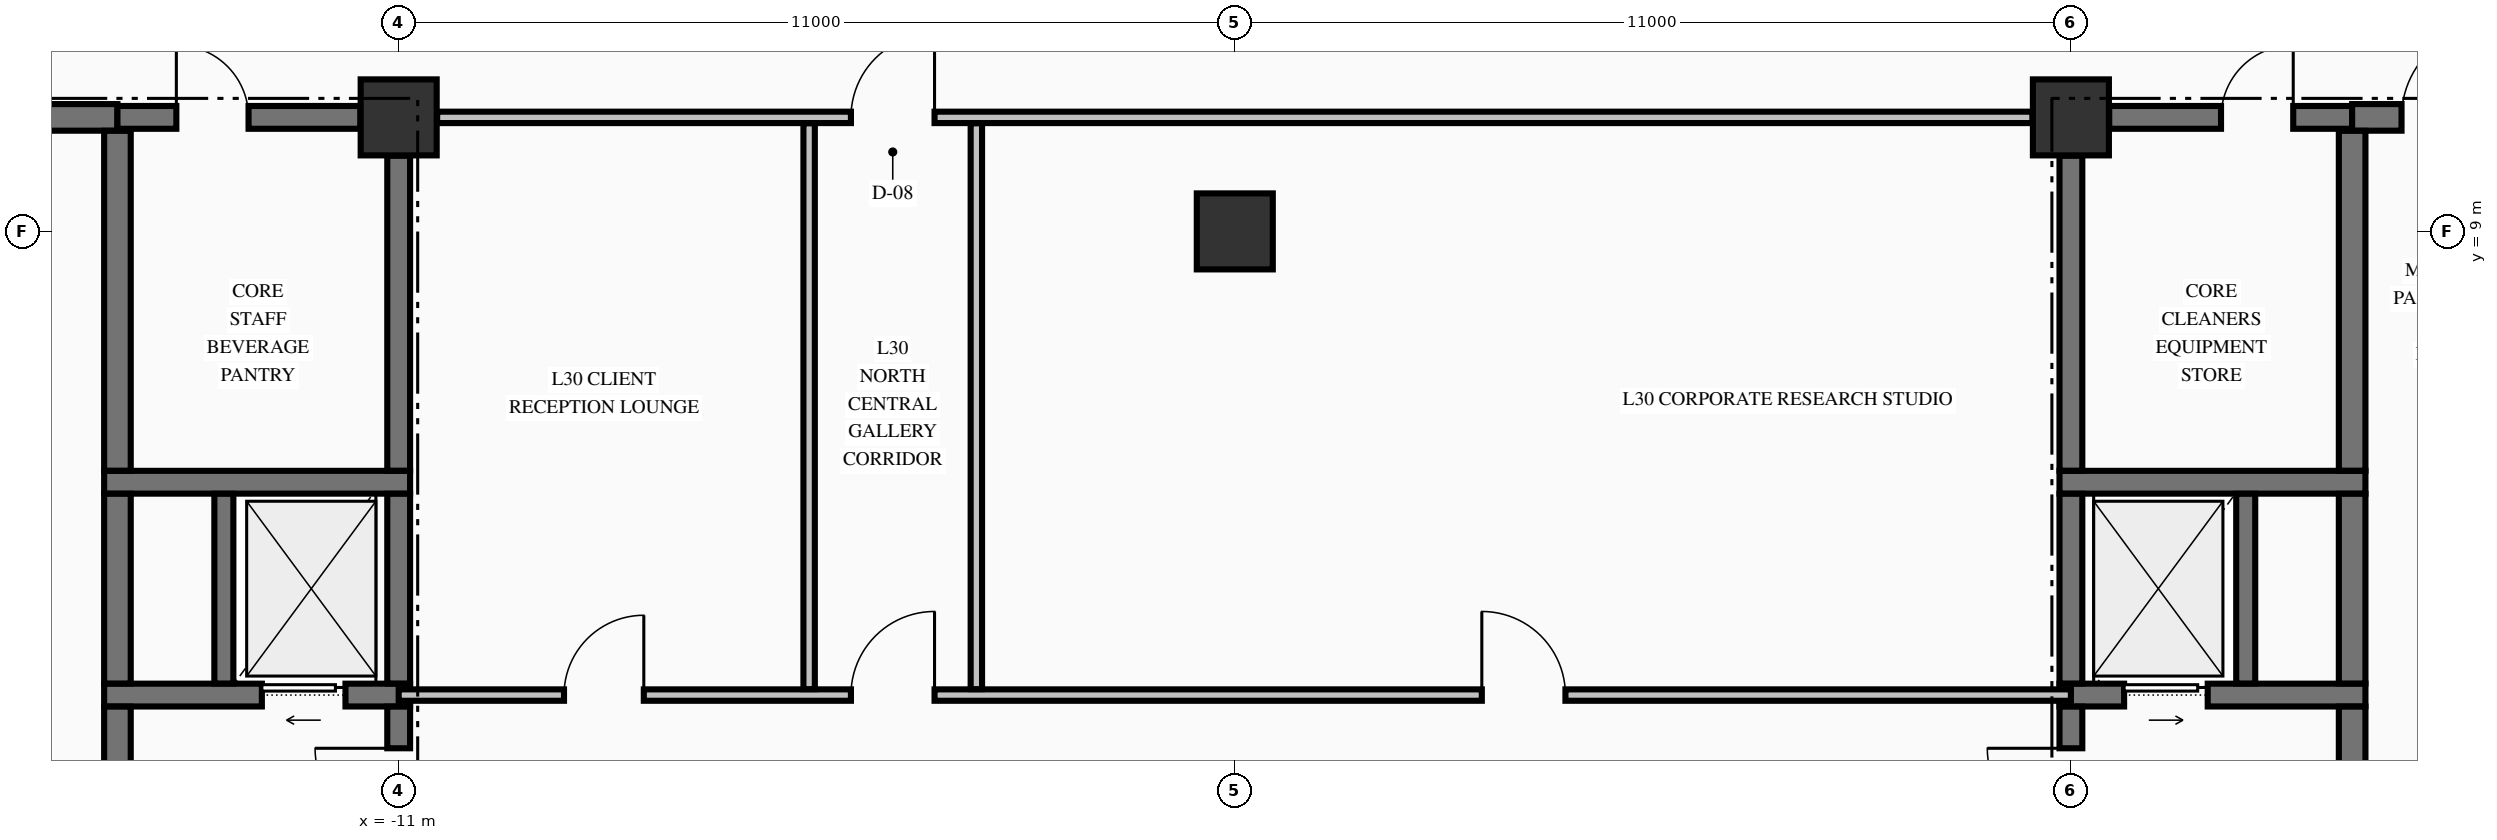
"""IFC4 building model, lengths in metres.
Left out: names, types, materials, properties, quantities, classifications, styles, units other than length and angle.
Written with IfcOpenShell. Run it as: python <this file> out.ifc"""

import sys

from ifc_helpers import new_model, si_unit, direction, frame, frame_2d, origin, origin_2d, place, context, subcontext, project, spatial, rectangle, extrude, element, fill, save


model = new_model("IFC4")
c1 = context("Model", 3, precision=1e-05, world=origin(), true_north=direction((0.0, 1.0)))
c2 = subcontext(c1, "Body", "Model", "MODEL_VIEW")
j1 = project(units=[si_unit("LENGTHUNIT", "METRE"), si_unit("PLANEANGLEUNIT", "RADIAN")], contexts=[c1])
p1 = place(None, origin())
s1 = spatial("IfcSite", under=j1, at=p1, CompositionType="ELEMENT")
p2 = place(p1, origin())
s2 = spatial("IfcBuilding", under=s1, at=p2, CompositionType="ELEMENT")
p3 = place(p2, frame((0.0, 0.0, 121.35)))
s3 = spatial("IfcBuildingStorey", under=s2, at=p3, CompositionType="ELEMENT", Elevation=121.35)
for number, where, z_axis, x_axis in (
    (1, (-11.0, 10.5, -0.425), (0.0, 0.0, 1.0), (1.0, 0.0, 0.0)),
    (2, (11.0, 10.5, -0.425), (0.0, 0.0, 1.0), (1.0, 0.0, 0.0)),
    (3, (0.0, 9.0, -0.425), (0.0, 0.0, 1.0), (1.0, 0.0, 0.0)),
):
    element("IfcColumn", number, at=place(p3, frame(where, z_axis=z_axis, x_axis=x_axis)), inside=s3, PredefinedType="COLUMN", context=c2, shape_type="SweptSolid", body=[
        extrude(rectangle(XDim=1.0, YDim=1.0, at=origin_2d()), origin(), (0.0, 0.0, 1.0), 3.745),
    ])
p4 = place(p3, frame((-14.875, 2.9, 0.0), z_axis=(0.0, 0.0, 1.0), x_axis=(1.0, 0.0, 0.0)))
e4 = element("IfcWall", 4, at=p4, inside=s3, PredefinedType="SHEAR", context=c2, shape_type="SweptSolid", body=[
    extrude(rectangle(XDim=4.025, YDim=0.3, at=frame_2d((2.012, 0.0))), origin(), (0.0, 0.0, 1.0), 3.32),
])
p5 = place(p4, frame((2.075, 0.0, 0.0)))
e5 = element("IfcOpeningElement", 5, at=p5, cuts=e4, PredefinedType="OPENING", context=c2, shape_type="SweptSolid", body=[
    extrude(rectangle(XDim=1.1, YDim=2.2, at=frame_2d((0.55, 1.1))), frame((0.0, 0.16, 0.0), z_axis=(0.0, -1.0, 0.0), x_axis=(1.0, 0.0, 0.0)), (0.0, 0.0, 1.0), 0.32),
])
p6 = place(p3, frame((10.85, 2.9, 0.0), z_axis=(0.0, 0.0, 1.0), x_axis=(1.0, 0.0, 0.0)))
e6 = element("IfcWall", 6, at=p6, inside=s3, PredefinedType="SHEAR", context=c2, shape_type="SweptSolid", body=[
    extrude(rectangle(XDim=4.025, YDim=0.3, at=frame_2d((2.012, 0.0))), origin(), (0.0, 0.0, 1.0), 3.32),
])
p7 = place(p6, frame((0.85, 0.0, 0.0)))
e7 = element("IfcOpeningElement", 7, at=p7, cuts=e6, PredefinedType="OPENING", context=c2, shape_type="SweptSolid", body=[
    extrude(rectangle(XDim=1.1, YDim=2.2, at=frame_2d((0.55, 1.1))), frame((0.0, 0.16, 0.0), z_axis=(0.0, -1.0, 0.0), x_axis=(1.0, 0.0, 0.0)), (0.0, 0.0, 1.0), 0.32),
])
for number, where, z_axis, x_axis in (
    (8, (-14.875, 5.7, 0.0), (0.0, 0.0, 1.0), (1.0, 0.0, 0.0)),
    (9, (10.85, 5.7, 0.0), (0.0, 0.0, 1.0), (1.0, 0.0, 0.0)),
):
    element("IfcWall", number, at=place(p3, frame(where, z_axis=z_axis, x_axis=x_axis)), inside=s3, PredefinedType="SHEAR", context=c2, shape_type="SweptSolid", body=[
        extrude(rectangle(XDim=4.025, YDim=0.3, at=frame_2d((2.012, 0.0))), origin(), (0.0, 0.0, 1.0), 3.32),
    ])
p8 = place(p3, frame((-19.496, 10.5, 0.0), z_axis=(0.0, 0.0, 1.0), x_axis=(1.0, 0.0, 0.0)))
e10 = element("IfcWall", 10, at=p8, inside=s3, PredefinedType="SHEAR", context=c2, shape_type="SweptSolid", body=[
    extrude(rectangle(XDim=4.796, YDim=0.35, at=frame_2d((2.398, 0.0))), origin(), (0.0, 0.0, 1.0), 3.32),
])
p9 = place(p8, frame((1.621, 0.0, 0.0)))
e11 = element("IfcOpeningElement", 11, at=p9, cuts=e10, PredefinedType="OPENING", context=c2, shape_type="SweptSolid", body=[
    extrude(rectangle(XDim=1.05, YDim=2.15, at=frame_2d((0.525, 1.075))), frame((0.0, 0.185, 0.0), z_axis=(0.0, -1.0, 0.0), x_axis=(1.0, 0.0, 0.0)), (0.0, 0.0, 1.0), 0.37),
])
p10 = place(p3, frame((-14.7, 10.5, 0.0), z_axis=(0.0, 0.0, 1.0), x_axis=(1.0, 0.0, 0.0)))
e12 = element("IfcWall", 12, at=p10, inside=s3, PredefinedType="SHEAR", context=c2, shape_type="SweptSolid", body=[
    extrude(rectangle(XDim=3.196, YDim=0.3, at=frame_2d((1.598, 0.0))), origin(), (0.0, 0.0, 1.0), 3.32),
])
p11 = place(p10, frame((0.775, 0.0, 0.0)))
e13 = element("IfcOpeningElement", 13, at=p11, cuts=e12, PredefinedType="OPENING", context=c2, shape_type="SweptSolid", body=[
    extrude(rectangle(XDim=0.95, YDim=2.15, at=frame_2d((0.475, 1.075))), frame((0.0, 0.16, 0.0), z_axis=(0.0, -1.0, 0.0), x_axis=(1.0, 0.0, 0.0)), (0.0, 0.0, 1.0), 0.32),
])
p12 = place(p3, frame((11.504, 10.5, 0.0), z_axis=(0.0, 0.0, 1.0), x_axis=(1.0, 0.0, 0.0)))
e14 = element("IfcWall", 14, at=p12, inside=s3, PredefinedType="SHEAR", context=c2, shape_type="SweptSolid", body=[
    extrude(rectangle(XDim=3.196, YDim=0.3, at=frame_2d((1.598, 0.0))), origin(), (0.0, 0.0, 1.0), 3.32),
])
p13 = place(p12, frame((1.471, 0.0, 0.0)))
e15 = element("IfcOpeningElement", 15, at=p13, cuts=e14, PredefinedType="OPENING", context=c2, shape_type="SweptSolid", body=[
    extrude(rectangle(XDim=0.95, YDim=2.15, at=frame_2d((0.475, 1.075))), frame((0.0, 0.16, 0.0), z_axis=(0.0, -1.0, 0.0), x_axis=(1.0, 0.0, 0.0)), (0.0, 0.0, 1.0), 0.32),
])
p14 = place(p3, frame((14.7, 10.5, 0.0), z_axis=(0.0, 0.0, 1.0), x_axis=(1.0, 0.0, 0.0)))
e16 = element("IfcWall", 16, at=p14, inside=s3, PredefinedType="SHEAR", context=c2, shape_type="SweptSolid", body=[
    extrude(rectangle(XDim=4.796, YDim=0.35, at=frame_2d((2.398, 0.0))), origin(), (0.0, 0.0, 1.0), 3.32),
])
p15 = place(p14, frame((0.65, 0.0, 0.0)))
e17 = element("IfcOpeningElement", 17, at=p15, cuts=e16, PredefinedType="OPENING", context=c2, shape_type="SweptSolid", body=[
    extrude(rectangle(XDim=1.2, YDim=2.15, at=frame_2d((0.6, 1.075))), frame((0.0, 0.185, 0.0), z_axis=(0.0, -1.0, 0.0), x_axis=(1.0, 0.0, 0.0)), (0.0, 0.0, 1.0), 0.37),
])
p16 = place(p14, frame((3.25, 0.0, 0.0)))
e18 = element("IfcOpeningElement", 18, at=p16, cuts=e16, PredefinedType="OPENING", context=c2, shape_type="SweptSolid", body=[
    extrude(rectangle(XDim=0.9, YDim=2.15, at=frame_2d((0.45, 1.075))), frame((0.0, 0.185, 0.0), z_axis=(0.0, -1.0, 0.0), x_axis=(1.0, 0.0, 0.0)), (0.0, 0.0, 1.0), 0.37),
])
p17 = place(p3, frame((-11.0, 2.9, 0.0), z_axis=(0.0, 0.0, 1.0), x_axis=(1.0, 0.0, 0.0)))
e19 = element("IfcWall", 19, at=p17, inside=s3, PredefinedType="PARTITIONING", context=c2, shape_type="SweptSolid", body=[
    extrude(rectangle(XDim=22.0, YDim=0.15, at=frame_2d((11.0, 0.0))), origin(), (0.0, 0.0, 1.0), 3.32),
])
p18 = place(p17, frame((5.95, 0.0, 0.0)))
e20 = element("IfcOpeningElement", 20, at=p18, cuts=e19, PredefinedType="OPENING", context=c2, shape_type="SweptSolid", body=[
    extrude(rectangle(XDim=1.1, YDim=2.15, at=frame_2d((0.55, 1.075))), frame((0.0, 0.085, 0.0), z_axis=(0.0, -1.0, 0.0), x_axis=(1.0, 0.0, 0.0)), (0.0, 0.0, 1.0), 0.17),
])
p19 = place(p17, frame((2.175, 0.0, 0.0)))
e21 = element("IfcOpeningElement", 21, at=p19, cuts=e19, PredefinedType="OPENING", context=c2, shape_type="SweptSolid", body=[
    extrude(rectangle(XDim=1.05, YDim=2.15, at=frame_2d((0.525, 1.075))), frame((0.0, 0.085, 0.0), z_axis=(0.0, -1.0, 0.0), x_axis=(1.0, 0.0, 0.0)), (0.0, 0.0, 1.0), 0.17),
])
p20 = place(p17, frame((14.25, 0.0, 0.0)))
e22 = element("IfcOpeningElement", 22, at=p20, cuts=e19, PredefinedType="OPENING", context=c2, shape_type="SweptSolid", body=[
    extrude(rectangle(XDim=1.1, YDim=2.15, at=frame_2d((0.55, 1.075))), frame((0.0, 0.085, 0.0), z_axis=(0.0, -1.0, 0.0), x_axis=(1.0, 0.0, 0.0)), (0.0, 0.0, 1.0), 0.17),
])
p21 = place(p3, frame((-10.494, 10.5, 0.0), z_axis=(0.0, 0.0, 1.0), x_axis=(1.0, 0.0, 0.0)))
e23 = element("IfcWall", 23, at=p21, inside=s3, PredefinedType="PARTITIONING", context=c2, shape_type="SweptSolid", body=[
    extrude(rectangle(XDim=20.988, YDim=0.15, at=frame_2d((10.494, 0.0))), origin(), (0.0, 0.0, 1.0), 3.32),
])
p22 = place(p21, frame((5.444, 0.0, 0.0)))
e24 = element("IfcOpeningElement", 24, at=p22, cuts=e23, PredefinedType="OPENING", context=c2, shape_type="SweptSolid", body=[
    extrude(rectangle(XDim=1.1, YDim=2.15, at=frame_2d((0.55, 1.075))), frame((0.0, 0.085, 0.0), z_axis=(0.0, -1.0, 0.0), x_axis=(1.0, 0.0, 0.0)), (0.0, 0.0, 1.0), 0.17),
])
p23 = place(p3, frame((-14.7, -0.098, 0.0), z_axis=(0.0, 0.0, 1.0), x_axis=(0.0, 1.0, 0.0)))
e25 = element("IfcWall", 25, at=p23, inside=s3, PredefinedType="SHEAR", context=c2, shape_type="SweptSolid", body=[
    extrude(rectangle(XDim=2.846, YDim=0.35, at=frame_2d((1.423, 0.0))), origin(), (0.0, 0.0, 1.0), 3.32),
])
p24 = place(p3, frame((-14.7, 3.052, 0.0), z_axis=(0.0, 0.0, 1.0), x_axis=(0.0, 1.0, 0.0)))
e26 = element("IfcWall", 26, at=p24, inside=s3, PredefinedType="SHEAR", context=c2, shape_type="SweptSolid", body=[
    extrude(rectangle(XDim=2.496, YDim=0.35, at=frame_2d((1.248, 0.0))), origin(), (0.0, 0.0, 1.0), 3.32),
])
p25 = place(p3, frame((-14.7, 5.852, 0.0), z_axis=(0.0, 0.0, 1.0), x_axis=(0.0, 1.0, 0.0)))
e27 = element("IfcWall", 27, at=p25, inside=s3, PredefinedType="SHEAR", context=c2, shape_type="SweptSolid", body=[
    extrude(rectangle(XDim=4.471, YDim=0.35, at=frame_2d((2.235, 0.0))), origin(), (0.0, 0.0, 1.0), 3.32),
])
p26 = place(p3, frame((-13.3, 3.052, 0.0), z_axis=(0.0, 0.0, 1.0), x_axis=(0.0, 1.0, 0.0)))
e28 = element("IfcWall", 28, at=p26, inside=s3, PredefinedType="SOLIDWALL", context=c2, shape_type="SweptSolid", body=[
    extrude(rectangle(XDim=2.496, YDim=0.25, at=frame_2d((1.248, 0.0))), origin(), (0.0, 0.0, 1.0), 3.32),
])
p27 = place(p3, frame((-11.0, 0.504, 0.0), z_axis=(0.0, 0.0, 1.0), x_axis=(0.0, 1.0, 0.0)))
e29 = element("IfcWall", 29, at=p27, inside=s3, PredefinedType="SHEAR", context=c2, shape_type="SweptSolid", body=[
    extrude(rectangle(XDim=2.244, YDim=0.3, at=frame_2d((1.122, 0.0))), origin(), (0.0, 0.0, 1.0), 3.32),
])
p28 = place(p27, frame((0.596, 0.0, 0.0)))
e30 = element("IfcOpeningElement", 30, at=p28, cuts=e29, PredefinedType="OPENING", context=c2, shape_type="SweptSolid", body=[
    extrude(rectangle(XDim=1.1, YDim=2.15, at=frame_2d((0.55, 1.075))), frame((0.0, 0.16, 0.0), z_axis=(0.0, -1.0, 0.0), x_axis=(1.0, 0.0, 0.0)), (0.0, 0.0, 1.0), 0.32),
])
p29 = place(p3, frame((-11.0, 3.052, 0.0), z_axis=(0.0, 0.0, 1.0), x_axis=(0.0, 1.0, 0.0)))
e31 = element("IfcWall", 31, at=p29, inside=s3, PredefinedType="SHEAR", context=c2, shape_type="SweptSolid", body=[
    extrude(rectangle(XDim=2.496, YDim=0.3, at=frame_2d((1.248, 0.0))), origin(), (0.0, 0.0, 1.0), 3.32),
])
p30 = place(p3, frame((-11.0, 5.852, 0.0), z_axis=(0.0, 0.0, 1.0), x_axis=(0.0, 1.0, 0.0)))
e32 = element("IfcWall", 32, at=p30, inside=s3, PredefinedType="SHEAR", context=c2, shape_type="SweptSolid", body=[
    extrude(rectangle(XDim=4.144, YDim=0.3, at=frame_2d((2.072, 0.0))), origin(), (0.0, 0.0, 1.0), 3.32),
])
p31 = place(p3, frame((11.0, 0.504, 0.0), z_axis=(0.0, 0.0, 1.0), x_axis=(0.0, 1.0, 0.0)))
e33 = element("IfcWall", 33, at=p31, inside=s3, PredefinedType="SHEAR", context=c2, shape_type="SweptSolid", body=[
    extrude(rectangle(XDim=2.244, YDim=0.3, at=frame_2d((1.122, 0.0))), origin(), (0.0, 0.0, 1.0), 3.32),
])
p32 = place(p31, frame((0.596, 0.0, 0.0)))
e34 = element("IfcOpeningElement", 34, at=p32, cuts=e33, PredefinedType="OPENING", context=c2, shape_type="SweptSolid", body=[
    extrude(rectangle(XDim=1.1, YDim=2.15, at=frame_2d((0.55, 1.075))), frame((0.0, 0.16, 0.0), z_axis=(0.0, -1.0, 0.0), x_axis=(1.0, 0.0, 0.0)), (0.0, 0.0, 1.0), 0.32),
])
p33 = place(p3, frame((11.0, 3.052, 0.0), z_axis=(0.0, 0.0, 1.0), x_axis=(0.0, 1.0, 0.0)))
e35 = element("IfcWall", 35, at=p33, inside=s3, PredefinedType="SHEAR", context=c2, shape_type="SweptSolid", body=[
    extrude(rectangle(XDim=2.496, YDim=0.3, at=frame_2d((1.248, 0.0))), origin(), (0.0, 0.0, 1.0), 3.32),
])
p34 = place(p3, frame((11.0, 5.852, 0.0), z_axis=(0.0, 0.0, 1.0), x_axis=(0.0, 1.0, 0.0)))
e36 = element("IfcWall", 36, at=p34, inside=s3, PredefinedType="SHEAR", context=c2, shape_type="SweptSolid", body=[
    extrude(rectangle(XDim=4.144, YDim=0.3, at=frame_2d((2.072, 0.0))), origin(), (0.0, 0.0, 1.0), 3.32),
])
p35 = place(p3, frame((13.3, 3.052, 0.0), z_axis=(0.0, 0.0, 1.0), x_axis=(0.0, 1.0, 0.0)))
e37 = element("IfcWall", 37, at=p35, inside=s3, PredefinedType="SOLIDWALL", context=c2, shape_type="SweptSolid", body=[
    extrude(rectangle(XDim=2.496, YDim=0.25, at=frame_2d((1.248, 0.0))), origin(), (0.0, 0.0, 1.0), 3.32),
])
p36 = place(p3, frame((14.7, -0.098, 0.0), z_axis=(0.0, 0.0, 1.0), x_axis=(0.0, 1.0, 0.0)))
e38 = element("IfcWall", 38, at=p36, inside=s3, PredefinedType="SHEAR", context=c2, shape_type="SweptSolid", body=[
    extrude(rectangle(XDim=2.846, YDim=0.35, at=frame_2d((1.423, 0.0))), origin(), (0.0, 0.0, 1.0), 3.32),
])
p37 = place(p3, frame((14.7, 3.052, 0.0), z_axis=(0.0, 0.0, 1.0), x_axis=(0.0, 1.0, 0.0)))
e39 = element("IfcWall", 39, at=p37, inside=s3, PredefinedType="SHEAR", context=c2, shape_type="SweptSolid", body=[
    extrude(rectangle(XDim=2.496, YDim=0.35, at=frame_2d((1.248, 0.0))), origin(), (0.0, 0.0, 1.0), 3.32),
])
p38 = place(p3, frame((14.7, 5.852, 0.0), z_axis=(0.0, 0.0, 1.0), x_axis=(0.0, 1.0, 0.0)))
e40 = element("IfcWall", 40, at=p38, inside=s3, PredefinedType="SHEAR", context=c2, shape_type="SweptSolid", body=[
    extrude(rectangle(XDim=4.471, YDim=0.35, at=frame_2d((2.235, 0.0))), origin(), (0.0, 0.0, 1.0), 3.32),
])
for number, where, z_axis, x_axis in (
    (41, (-5.6, 2.978, 0.0), (0.0, 0.0, 1.0), (0.0, 1.0, 0.0)),
    (42, (-3.4, 2.978, 0.0), (0.0, 0.0, 1.0), (0.0, 1.0, 0.0)),
):
    element("IfcWall", number, at=place(p3, frame(where, z_axis=z_axis, x_axis=x_axis)), inside=s3, PredefinedType="PARTITIONING", context=c2, shape_type="SweptSolid", body=[
        extrude(rectangle(XDim=7.444, YDim=0.15, at=frame_2d((3.722, 0.0))), origin(), (0.0, 0.0, 1.0), 3.32),
    ])
p39 = place(p28, origin())
e43 = element("IfcDoor", 43, at=p39, inside=s3, OperationType="SINGLE_SWING_RIGHT", PredefinedType="DOOR", context=c2, shape_type="SweptSolid", body=[
    extrude(rectangle(XDim=1.1, YDim=2.15, at=frame_2d((0.55, 1.075))), frame((0.0, 0.025, 0.0), z_axis=(0.0, -1.0, 0.0), x_axis=(1.0, 0.0, 0.0)), (0.0, 0.0, 1.0), 0.05),
])
fill(e30, e43)
p40 = place(p5, origin())
e44 = element("IfcDoor", 44, at=p40, inside=s3, OperationType="SLIDING_TO_LEFT", PredefinedType="DOOR", context=c2, shape_type="SweptSolid", body=[
    extrude(rectangle(XDim=1.1, YDim=2.2, at=frame_2d((0.55, 1.1))), frame((0.0, 0.025, 0.0), z_axis=(0.0, -1.0, 0.0), x_axis=(1.0, 0.0, 0.0)), (0.0, 0.0, 1.0), 0.05),
])
fill(e5, e44)
p41 = place(p32, origin())
e45 = element("IfcDoor", 45, at=p41, inside=s3, OperationType="SINGLE_SWING_RIGHT", PredefinedType="DOOR", context=c2, shape_type="SweptSolid", body=[
    extrude(rectangle(XDim=1.1, YDim=2.15, at=frame_2d((0.55, 1.075))), frame((0.0, 0.025, 0.0), z_axis=(0.0, -1.0, 0.0), x_axis=(1.0, 0.0, 0.0)), (0.0, 0.0, 1.0), 0.05),
])
fill(e34, e45)
p42 = place(p7, origin())
e46 = element("IfcDoor", 46, at=p42, inside=s3, OperationType="SLIDING_TO_RIGHT", PredefinedType="DOOR", context=c2, shape_type="SweptSolid", body=[
    extrude(rectangle(XDim=1.1, YDim=2.2, at=frame_2d((0.55, 1.1))), frame((0.0, 0.025, 0.0), z_axis=(0.0, -1.0, 0.0), x_axis=(1.0, 0.0, 0.0)), (0.0, 0.0, 1.0), 0.05),
])
fill(e7, e46)
p43 = place(p11, origin())
e47 = element("IfcDoor", 47, at=p43, inside=s3, OperationType="SINGLE_SWING_LEFT", PredefinedType="DOOR", context=c2, shape_type="SweptSolid", body=[
    extrude(rectangle(XDim=0.95, YDim=2.15, at=frame_2d((0.475, 1.075))), frame((0.0, 0.025, 0.0), z_axis=(0.0, -1.0, 0.0), x_axis=(1.0, 0.0, 0.0)), (0.0, 0.0, 1.0), 0.05),
])
fill(e13, e47)
p44 = place(p13, origin())
e48 = element("IfcDoor", 48, at=p44, inside=s3, OperationType="SINGLE_SWING_RIGHT", PredefinedType="DOOR", context=c2, shape_type="SweptSolid", body=[
    extrude(rectangle(XDim=0.95, YDim=2.15, at=frame_2d((0.475, 1.075))), frame((0.0, 0.025, 0.0), z_axis=(0.0, -1.0, 0.0), x_axis=(1.0, 0.0, 0.0)), (0.0, 0.0, 1.0), 0.05),
])
fill(e15, e48)
p45 = place(p15, origin())
e49 = element("IfcDoor", 49, at=p45, inside=s3, OperationType="SINGLE_SWING_RIGHT", PredefinedType="DOOR", context=c2, shape_type="SweptSolid", body=[
    extrude(rectangle(XDim=1.2, YDim=2.15, at=frame_2d((0.6, 1.075))), frame((0.0, 0.025, 0.0), z_axis=(0.0, -1.0, 0.0), x_axis=(1.0, 0.0, 0.0)), (0.0, 0.0, 1.0), 0.05),
])
fill(e17, e49)
p46 = place(p22, origin())
e50 = element("IfcDoor", 50, at=p46, inside=s3, OperationType="SINGLE_SWING_RIGHT", PredefinedType="DOOR", context=c2, shape_type="SweptSolid", body=[
    extrude(rectangle(XDim=1.1, YDim=2.15, at=frame_2d((0.55, 1.075))), frame((0.0, 0.025, 0.0), z_axis=(0.0, -1.0, 0.0), x_axis=(1.0, 0.0, 0.0)), (0.0, 0.0, 1.0), 0.05),
])
fill(e24, e50)
p47 = place(p18, origin())
e51 = element("IfcDoor", 51, at=p47, inside=s3, OperationType="SINGLE_SWING_RIGHT", PredefinedType="DOOR", context=c2, shape_type="SweptSolid", body=[
    extrude(rectangle(XDim=1.1, YDim=2.15, at=frame_2d((0.55, 1.075))), frame((0.0, 0.025, 0.0), z_axis=(0.0, -1.0, 0.0), x_axis=(1.0, 0.0, 0.0)), (0.0, 0.0, 1.0), 0.05),
])
fill(e20, e51)
p48 = place(p19, origin())
e52 = element("IfcDoor", 52, at=p48, inside=s3, OperationType="SINGLE_SWING_RIGHT", PredefinedType="DOOR", context=c2, shape_type="SweptSolid", body=[
    extrude(rectangle(XDim=1.05, YDim=2.15, at=frame_2d((0.525, 1.075))), frame((0.0, 0.025, 0.0), z_axis=(0.0, -1.0, 0.0), x_axis=(1.0, 0.0, 0.0)), (0.0, 0.0, 1.0), 0.05),
])
fill(e21, e52)
p49 = place(p20, origin())
e53 = element("IfcDoor", 53, at=p49, inside=s3, OperationType="SINGLE_SWING_LEFT", PredefinedType="DOOR", context=c2, shape_type="SweptSolid", body=[
    extrude(rectangle(XDim=1.1, YDim=2.15, at=frame_2d((0.55, 1.075))), frame((0.0, 0.025, 0.0), z_axis=(0.0, -1.0, 0.0), x_axis=(1.0, 0.0, 0.0)), (0.0, 0.0, 1.0), 0.05),
])
fill(e22, e53)
save(model, sys.argv[1])
